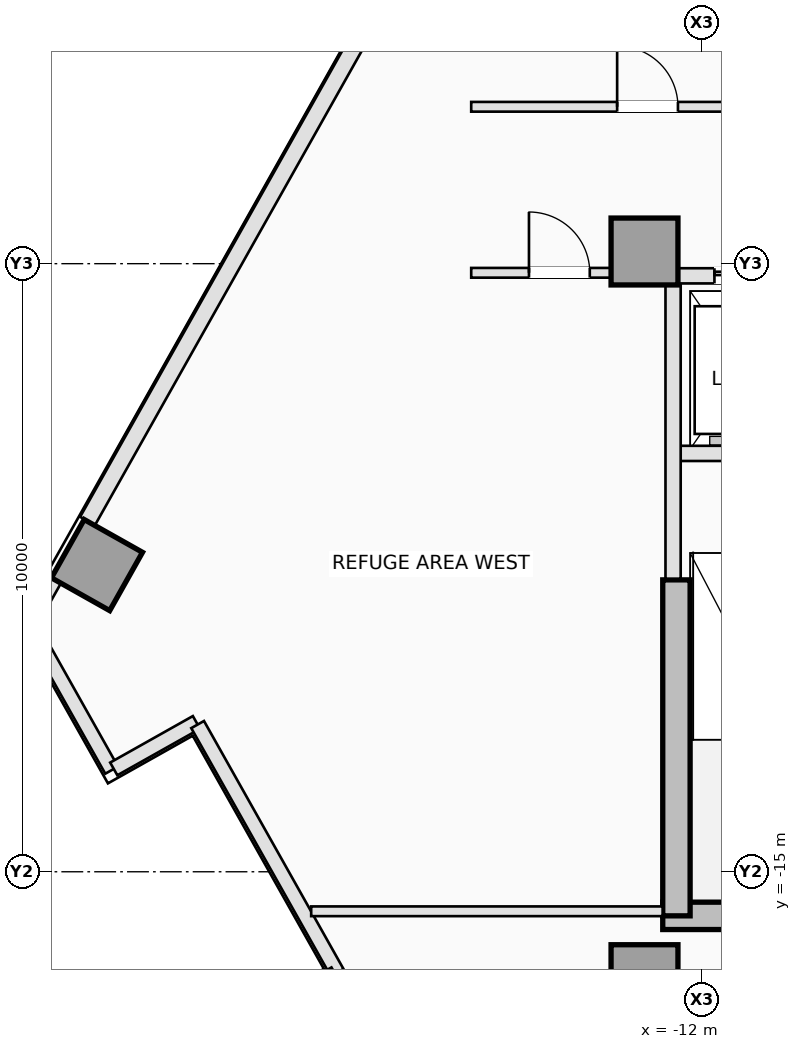
"""IFC4 building model, lengths in metres.
Left out: names, types, materials, properties, quantities, classifications, styles, units other than length and angle.
Written with IfcOpenShell. Run it as: python <this file> out.ifc"""

import sys

from ifc_helpers import new_model, si_unit, direction, frame, frame_2d, origin, origin_2d, place, context, subcontext, project, spatial, rectangle, extrude, element, fill, save


model = new_model("IFC4")
c1 = context("Model", 3, precision=1e-05, world=origin(), true_north=direction((0.0, 1.0)))
c2 = subcontext(c1, "Body", "Model", "MODEL_VIEW")
j1 = project(units=[si_unit("LENGTHUNIT", "METRE"), si_unit("PLANEANGLEUNIT", "RADIAN")], contexts=[c1])
p1 = place(None, origin())
s1 = spatial("IfcSite", under=j1, at=p1, CompositionType="ELEMENT")
p2 = place(p1, origin())
s2 = spatial("IfcBuilding", under=s1, at=p2, CompositionType="ELEMENT")
p3 = place(p2, frame((0.0, 0.0, 90.6)))
s3 = spatial("IfcBuildingStorey", under=s2, at=p3, CompositionType="ELEMENT", Elevation=90.6)
p4 = place(p3, frame((-12.65, -15.725, 0.0), z_axis=(0.0, 0.0, 1.0), x_axis=(1.0, 0.0, 0.0)))
e1 = element("IfcWall", 1, at=p4, inside=s3, PredefinedType="SHEAR", context=c2, shape_type="SweptSolid", body=[
    extrude(rectangle(XDim=3.9, YDim=0.45, at=frame_2d((1.95, 0.0))), origin(), (0.0, 0.0, 1.0), 4.4),
])
p5 = place(p3, frame((-12.425, -15.725, 0.0), z_axis=(0.0, 0.0, 1.0), x_axis=(0.0, 1.0, 0.0)))
e2 = element("IfcWall", 2, at=p5, inside=s3, PredefinedType="SHEAR", context=c2, shape_type="SweptSolid", body=[
    extrude(rectangle(XDim=5.525, YDim=0.45, at=frame_2d((2.763, 0.0))), origin(), (0.0, 0.0, 1.0), 4.4),
])
for number, where, z_axis, x_axis in (
    (3, (-12.95, -16.75, 0.0), (0.0, 0.0, 1.0), (1.0, 0.0, 0.0)),
    (4, (-12.95, -4.8, 0.0), (0.0, 0.0, 1.0), (1.0, 0.0, 0.0)),
    (5, (-21.955, -9.957, 0.0), (0.0, 0.0, 1.0), (-0.872, 0.49, 0.0)),
):
    element("IfcColumn", number, at=place(p3, frame(where, z_axis=z_axis, x_axis=x_axis)), inside=s3, PredefinedType="COLUMN", context=c2, shape_type="SweptSolid", body=[
        extrude(rectangle(XDim=1.1, YDim=1.1, at=origin_2d()), origin(), (0.0, 0.0, 1.0), 4.4),
    ])
p6 = place(p3, frame((-23.078, -10.954, 0.0), z_axis=(0.0, 0.0, 1.0), x_axis=(0.490355003566, 0.871522788272, 0.0)))
e6 = element("IfcWall", 6, at=p6, inside=s3, PredefinedType="STANDARD", context=c2, shape_type="SweptSolid", body=[
    extrude(rectangle(XDim=0.865, YDim=0.24, at=frame_2d((0.433, 0.0))), origin(), (0.0, 0.0, 1.0), 4.15),
])
p7 = place(p3, frame((-22.11, -9.232, 0.0), z_axis=(0.0, 0.0, 1.0), x_axis=(0.49024893553, 0.871582458068, 0.0)))
e7 = element("IfcWall", 7, at=p7, inside=s3, PredefinedType="STANDARD", context=c2, shape_type="SweptSolid", body=[
    extrude(rectangle(XDim=10.363, YDim=0.28, at=frame_2d((5.181, 0.0))), origin(), (0.0, 0.0, 1.0), 4.15),
])
p8 = place(p3, frame((-23.044, -10.963, 0.0), z_axis=(0.0, 0.0, 1.0), x_axis=(0.490218533594, -0.871599557894, 0.0)))
e8 = element("IfcWall", 8, at=p8, inside=s3, PredefinedType="STANDARD", context=c2, shape_type="SweptSolid", body=[
    extrude(rectangle(XDim=2.714, YDim=0.24, at=frame_2d((1.357, 0.0))), origin(), (0.0, 0.0, 1.0), 4.15),
])
p9 = place(p3, frame((-21.678, -13.309, 0.0), z_axis=(0.0, 0.0, 1.0), x_axis=(0.871546278971, 0.490313250496, 0.0)))
e9 = element("IfcWall", 9, at=p9, inside=s3, PredefinedType="STANDARD", context=c2, shape_type="SweptSolid", body=[
    extrude(rectangle(XDim=1.56, YDim=0.24, at=frame_2d((0.78, 0.0))), origin(), (0.0, 0.0, 1.0), 4.15),
])
p10 = place(p3, frame((-20.299, -12.579, 0.0), z_axis=(0.0, 0.0, 1.0), x_axis=(0.490313250496, -0.871546278971, 0.0)))
e10 = element("IfcWall", 10, at=p10, inside=s3, PredefinedType="STANDARD", context=c2, shape_type="SweptSolid", body=[
    extrude(rectangle(XDim=4.68, YDim=0.24, at=frame_2d((2.34, 0.0))), origin(), (0.0, 0.0, 1.0), 3.622),
])
p11 = place(p3, frame((-18.039, -16.677, 0.0), z_axis=(0.0, 0.0, 1.0), x_axis=(-0.871546278971, -0.490313250496, 0.0)))
e11 = element("IfcWall", 11, at=p11, inside=s3, PredefinedType="STANDARD", context=c2, shape_type="SweptSolid", body=[
    extrude(rectangle(XDim=1.56, YDim=0.24, at=frame_2d((0.78, 0.0))), origin(), (0.0, 0.0, 1.0), 4.15),
])
p12 = place(p3, frame((-12.38, -8.12, 0.0), z_axis=(0.0, 0.0, 1.0), x_axis=(1.0, 0.0, 0.0)))
e12 = element("IfcWall", 12, at=p12, inside=s3, PredefinedType="PARTITIONING", context=c2, shape_type="SweptSolid", body=[
    extrude(rectangle(XDim=3.22, YDim=0.25, at=frame_2d((1.61, 0.0))), origin(), (0.0, 0.0, 1.0), 4.15),
])
p13 = place(p3, frame((-12.48, -10.18, 0.0), z_axis=(0.0, 0.0, 1.0), x_axis=(0.0, 1.0, 0.0)))
e13 = element("IfcWall", 13, at=p13, inside=s3, PredefinedType="PARTITIONING", context=c2, shape_type="SweptSolid", body=[
    extrude(rectangle(XDim=4.828, YDim=0.25, at=frame_2d((2.414, 0.0))), origin(), (0.0, 0.0, 1.0), 4.15),
])
p14 = place(p3, frame((-12.398, -5.2, 0.0), z_axis=(0.0, 0.0, 1.0), x_axis=(1.0, 0.0, 0.0)))
e14 = element("IfcWall", 14, at=p14, inside=s3, PredefinedType="PARTITIONING", context=c2, shape_type="SweptSolid", body=[
    extrude(rectangle(XDim=8.096, YDim=0.25, at=frame_2d((4.048, 0.0))), origin(), (0.0, 0.0, 1.0), 4.15),
])
p15 = place(p14, frame((0.598, 0.0, 0.0)))
e15 = element("IfcOpeningElement", 15, at=p15, cuts=e14, PredefinedType="OPENING", context=c2, shape_type="SweptSolid", body=[
    extrude(rectangle(XDim=1.0, YDim=2.15, at=frame_2d((0.5, 1.075))), frame((0.0, 0.135, 0.0), z_axis=(0.0, -1.0, 0.0), x_axis=(1.0, 0.0, 0.0)), (0.0, 0.0, 1.0), 0.27),
])
p16 = place(p14, frame((2.548, 0.0, 0.0)))
e16 = element("IfcOpeningElement", 16, at=p16, cuts=e14, PredefinedType="OPENING", context=c2, shape_type="SweptSolid", body=[
    extrude(rectangle(XDim=1.0, YDim=2.15, at=frame_2d((0.5, 1.075))), frame((0.0, 0.135, 0.0), z_axis=(0.0, -1.0, 0.0), x_axis=(1.0, 0.0, 0.0)), (0.0, 0.0, 1.0), 0.27),
])
p17 = place(p14, frame((4.498, 0.0, 0.0)))
e17 = element("IfcOpeningElement", 17, at=p17, cuts=e14, PredefinedType="OPENING", context=c2, shape_type="SweptSolid", body=[
    extrude(rectangle(XDim=1.0, YDim=2.15, at=frame_2d((0.5, 1.075))), frame((0.0, 0.135, 0.0), z_axis=(0.0, -1.0, 0.0), x_axis=(1.0, 0.0, 0.0)), (0.0, 0.0, 1.0), 0.27),
])
p18 = place(p14, frame((6.448, 0.0, 0.0)))
e18 = element("IfcOpeningElement", 18, at=p18, cuts=e14, PredefinedType="OPENING", context=c2, shape_type="SweptSolid", body=[
    extrude(rectangle(XDim=1.0, YDim=2.15, at=frame_2d((0.5, 1.075))), frame((0.0, 0.135, 0.0), z_axis=(0.0, -1.0, 0.0), x_axis=(1.0, 0.0, 0.0)), (0.0, 0.0, 1.0), 0.27),
])
p19 = place(p3, frame((-18.432, -15.65, 0.0), z_axis=(0.0, 0.0, 1.0), x_axis=(1.0, 0.0, 0.0)))
e19 = element("IfcWall", 19, at=p19, inside=s3, PredefinedType="PARTITIONING", context=c2, shape_type="SweptSolid", body=[
    extrude(rectangle(XDim=5.78, YDim=0.16, at=frame_2d((2.89, 0.0))), origin(), (0.0, 0.0, 1.0), 4.15),
])
p20 = place(p3, frame((-15.8, -2.42, 0.0), z_axis=(0.0, 0.0, 1.0), x_axis=(1.0, 0.0, 0.0)))
e20 = element("IfcWall", 20, at=p20, inside=s3, PredefinedType="PARTITIONING", context=c2, shape_type="SweptSolid", body=[
    extrude(rectangle(XDim=6.058, YDim=0.16, at=frame_2d((3.029, 0.0))), origin(), (0.0, 0.0, 1.0), 4.15),
])
p21 = place(p20, frame((2.4, 0.0, 0.0)))
e21 = element("IfcOpeningElement", 21, at=p21, cuts=e20, PredefinedType="OPENING", context=c2, shape_type="SweptSolid", body=[
    extrude(rectangle(XDim=1.0, YDim=2.15, at=frame_2d((0.5, 1.075))), frame((0.0, 0.09, 0.0), z_axis=(0.0, -1.0, 0.0), x_axis=(1.0, 0.0, 0.0)), (0.0, 0.0, 1.0), 0.18),
])
p22 = place(p3, frame((-15.8, -5.15, 0.0), z_axis=(0.0, 0.0, 1.0), x_axis=(1.0, 0.0, 0.0)))
e22 = element("IfcWall", 22, at=p22, inside=s3, PredefinedType="PARTITIONING", context=c2, shape_type="SweptSolid", body=[
    extrude(rectangle(XDim=2.298, YDim=0.16, at=frame_2d((1.149, 0.0))), origin(), (0.0, 0.0, 1.0), 4.15),
])
p23 = place(p22, frame((0.95, 0.0, 0.0)))
e23 = element("IfcOpeningElement", 23, at=p23, cuts=e22, PredefinedType="OPENING", context=c2, shape_type="SweptSolid", body=[
    extrude(rectangle(XDim=1.0, YDim=2.15, at=frame_2d((0.5, 1.075))), frame((0.0, 0.09, 0.0), z_axis=(0.0, -1.0, 0.0), x_axis=(1.0, 0.0, 0.0)), (0.0, 0.0, 1.0), 0.18),
])
p24 = place(p15, origin())
e24 = element("IfcDoor", 24, at=p24, inside=s3, OperationType="SLIDING_TO_LEFT", PredefinedType="DOOR", context=c2, shape_type="SweptSolid", body=[
    extrude(rectangle(XDim=1.0, YDim=2.15, at=frame_2d((0.5, 1.075))), frame((0.0, 0.025, 0.0), z_axis=(0.0, -1.0, 0.0), x_axis=(1.0, 0.0, 0.0)), (0.0, 0.0, 1.0), 0.05),
])
fill(e15, e24)
p25 = place(p21, origin())
e25 = element("IfcDoor", 25, at=p25, inside=s3, OperationType="SINGLE_SWING_LEFT", PredefinedType="DOOR", context=c2, shape_type="SweptSolid", body=[
    extrude(rectangle(XDim=1.0, YDim=2.15, at=frame_2d((0.5, 1.075))), frame((0.0, 0.025, 0.0), z_axis=(0.0, -1.0, 0.0), x_axis=(1.0, 0.0, 0.0)), (0.0, 0.0, 1.0), 0.05),
])
fill(e21, e25)
p26 = place(p23, origin())
e26 = element("IfcDoor", 26, at=p26, inside=s3, OperationType="SINGLE_SWING_LEFT", PredefinedType="DOOR", context=c2, shape_type="SweptSolid", body=[
    extrude(rectangle(XDim=1.0, YDim=2.15, at=frame_2d((0.5, 1.075))), frame((0.0, 0.025, 0.0), z_axis=(0.0, -1.0, 0.0), x_axis=(1.0, 0.0, 0.0)), (0.0, 0.0, 1.0), 0.05),
])
fill(e23, e26)
save(model, sys.argv[1])
